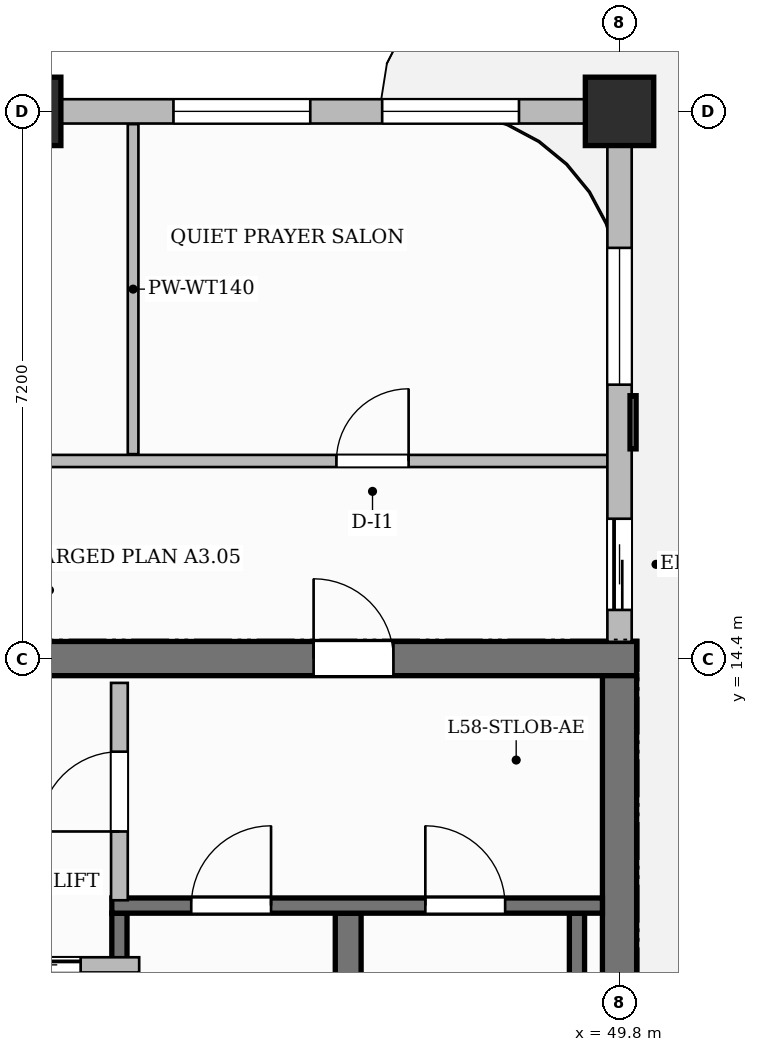
"""IFC4 building model, lengths in metres.
Left out: names, types, materials, properties, quantities, classifications, styles, units other than length and angle.
Written with IfcOpenShell. Run it as: python <this file> out.ifc"""

import sys

from ifc_helpers import new_model, si_unit, direction, frame, frame_2d, origin, origin_2d, place, context, subcontext, project, spatial, rectangle, extrude, source, transform, mapped, element, fill, save


model = new_model("IFC4")
c1 = context("Model", 3, precision=1e-05, world=origin(), true_north=direction((0.0, 1.0)))
c2 = subcontext(c1, "Body", "Model", "MODEL_VIEW")
j1 = project(units=[si_unit("LENGTHUNIT", "METRE"), si_unit("PLANEANGLEUNIT", "RADIAN")], contexts=[c1])
p1 = place(None, origin())
s1 = spatial("IfcSite", under=j1, at=p1, CompositionType="ELEMENT")
p2 = place(p1, origin())
s2 = spatial("IfcBuilding", under=s1, at=p2, CompositionType="ELEMENT")
p3 = place(p2, frame((0.0, 0.0, 232.7)))
s3 = spatial("IfcBuildingStorey", under=s2, at=p3, CompositionType="ELEMENT", Elevation=232.7)
p4 = place(p3, frame((34.575, 14.4, 0.0), z_axis=(0.0, 0.0, 1.0), x_axis=(1.0, 0.0, 0.0)))
e1 = element("IfcWall", 1, at=p4, inside=s3, PredefinedType="SHEAR", context=c2, shape_type="SweptSolid", body=[
    extrude(rectangle(XDim=15.45, YDim=0.45, at=frame_2d((7.725, 0.0))), origin(), (0.0, 0.0, 1.0), 3.85),
])
p5 = place(p4, frame((5.355, 0.0, 0.0)))
e2 = element("IfcOpeningElement", 2, at=p5, cuts=e1, PredefinedType="OPENING", context=c2, shape_type="SweptSolid", body=[
    extrude(rectangle(XDim=1.5, YDim=2.2, at=frame_2d((0.75, 1.1))), frame((0.0, 0.235, 0.0), z_axis=(0.0, -1.0, 0.0), x_axis=(1.0, 0.0, 0.0)), (0.0, 0.0, 1.0), 0.47),
])
p6 = place(p4, frame((1.57, 0.0, 0.0)))
e3 = element("IfcOpeningElement", 3, at=p6, cuts=e1, PredefinedType="OPENING", context=c2, shape_type="SweptSolid", body=[
    extrude(rectangle(XDim=1.05, YDim=2.15, at=frame_2d((0.525, 1.075))), frame((0.0, 0.235, 0.0), z_axis=(0.0, -1.0, 0.0), x_axis=(1.0, 0.0, 0.0)), (0.0, 0.0, 1.0), 0.47),
])
p7 = place(p4, frame((11.2, 0.0, 0.0)))
e4 = element("IfcOpeningElement", 4, at=p7, cuts=e1, PredefinedType="OPENING", context=c2, shape_type="SweptSolid", body=[
    extrude(rectangle(XDim=1.05, YDim=2.15, at=frame_2d((0.525, 1.075))), frame((0.0, 0.235, 0.0), z_axis=(0.0, -1.0, 0.0), x_axis=(1.0, 0.0, 0.0)), (0.0, 0.0, 1.0), 0.47),
])
p8 = place(p3, frame((49.8, 3.825, 0.0), z_axis=(0.0, 0.0, 1.0), x_axis=(0.0, 1.0, 0.0)))
e5 = element("IfcWall", 5, at=p8, inside=s3, PredefinedType="SHEAR", context=c2, shape_type="SweptSolid", body=[
    extrude(rectangle(XDim=10.35, YDim=0.45, at=frame_2d((5.175, 0.0))), origin(), (0.0, 0.0, 1.0), 3.85),
])
m1 = source(origin(), c2, "Body", "SweptSolid", [
    extrude(rectangle(XDim=0.9, YDim=0.9, at=origin_2d()), origin(), (0.0, 0.0, 1.0), 3.85),
])
for number, where, z_axis, x_axis in (
    (6, (42.0, 21.6, 0.0), (0.0, 0.0, 1.0), (1.0, 0.0, 0.0)),
    (7, (49.8, 21.6, 0.0), (0.0, 0.0, 1.0), (1.0, 0.0, 0.0)),
):
    element("IfcColumn", number, at=place(p3, frame(where, z_axis=z_axis, x_axis=x_axis)), inside=s3, PredefinedType="COLUMN", context=c2, shape_type="MappedRepresentation", body=[
        mapped(m1, transform((0.0, 0.0, 0.0), scale=1.0)),
    ])
p9 = place(p3, frame((43.22, 4.1, 0.0), z_axis=(0.0, 0.0, 1.0), x_axis=(0.0, 1.0, 0.0)))
e8 = element("IfcWall", 8, at=p9, inside=s3, PredefinedType="SHEAR", context=c2, shape_type="SweptSolid", body=[
    extrude(rectangle(XDim=6.95, YDim=0.2, at=frame_2d((3.475, 0.0))), origin(), (0.0, 0.0, 1.0), 3.85),
])
p10 = place(p3, frame((46.23, 4.1, 0.0), z_axis=(0.0, 0.0, 1.0), x_axis=(0.0, 1.0, 0.0)))
e9 = element("IfcWall", 9, at=p10, inside=s3, PredefinedType="SHEAR", context=c2, shape_type="SweptSolid", body=[
    extrude(rectangle(XDim=6.95, YDim=0.34, at=frame_2d((3.475, 0.0))), origin(), (0.0, 0.0, 1.0), 3.85),
])
p11 = place(p3, frame((49.24, 4.1, 0.0), z_axis=(0.0, 0.0, 1.0), x_axis=(0.0, 1.0, 0.0)))
e10 = element("IfcWall", 10, at=p11, inside=s3, PredefinedType="SHEAR", context=c2, shape_type="SweptSolid", body=[
    extrude(rectangle(XDim=6.95, YDim=0.2, at=frame_2d((3.475, 0.0))), origin(), (0.0, 0.0, 1.0), 3.85),
])
p12 = place(p3, frame((43.12, 11.15, 0.0), z_axis=(0.0, 0.0, 1.0), x_axis=(1.0, 0.0, 0.0)))
e11 = element("IfcWall", 11, at=p12, inside=s3, PredefinedType="SHEAR", context=c2, shape_type="SweptSolid", body=[
    extrude(rectangle(XDim=6.455, YDim=0.2, at=frame_2d((3.228, 0.0))), origin(), (0.0, 0.0, 1.0), 3.85),
])
p13 = place(p12, frame((1.045, 0.0, 0.0)))
e12 = element("IfcOpeningElement", 12, at=p13, cuts=e11, PredefinedType="OPENING", context=c2, shape_type="SweptSolid", body=[
    extrude(rectangle(XDim=1.05, YDim=2.2, at=frame_2d((0.525, 1.1))), frame((0.0, 0.11, 0.0), z_axis=(0.0, -1.0, 0.0), x_axis=(1.0, 0.0, 0.0)), (0.0, 0.0, 1.0), 0.22),
])
p14 = place(p12, frame((4.125, 0.0, 0.0)))
e13 = element("IfcOpeningElement", 13, at=p14, cuts=e11, PredefinedType="OPENING", context=c2, shape_type="SweptSolid", body=[
    extrude(rectangle(XDim=1.05, YDim=2.2, at=frame_2d((0.525, 1.1))), frame((0.0, 0.11, 0.0), z_axis=(0.0, -1.0, 0.0), x_axis=(1.0, 0.0, 0.0)), (0.0, 0.0, 1.0), 0.22),
])
p15 = place(p3, frame((43.22, 11.22, 0.0), z_axis=(0.0, 0.0, 1.0), x_axis=(0.0, 1.0, 0.0)))
e14 = element("IfcWall", 14, at=p15, inside=s3, PredefinedType="PARTITIONING", context=c2, shape_type="SweptSolid", body=[
    extrude(rectangle(XDim=2.86, YDim=0.22, at=frame_2d((1.43, 0.0))), origin(), (0.0, 0.0, 1.0), 3.6),
])
p16 = place(p15, frame((0.905, 0.0, 0.0)))
e15 = element("IfcOpeningElement", 15, at=p16, cuts=e14, PredefinedType="OPENING", context=c2, shape_type="SweptSolid", body=[
    extrude(rectangle(XDim=1.05, YDim=2.15, at=frame_2d((0.525, 1.075))), frame((0.0, 0.12, 0.0), z_axis=(0.0, -1.0, 0.0), x_axis=(1.0, 0.0, 0.0)), (0.0, 0.0, 1.0), 0.24),
])
p17 = place(p3, frame((30.29, 17.0, 0.0), z_axis=(0.0, 0.0, 1.0), x_axis=(1.0, 0.0, 0.0)))
e16 = element("IfcWall", 16, at=p17, inside=s3, PredefinedType="PARTITIONING", context=c2, shape_type="SweptSolid", body=[
    extrude(rectangle(XDim=19.37, YDim=0.16, at=frame_2d((9.685, 0.0))), origin(), (0.0, 0.0, 1.0), 3.6),
])
p18 = place(p17, frame((1.235, 0.0, 0.0)))
e17 = element("IfcOpeningElement", 17, at=p18, cuts=e16, PredefinedType="OPENING", context=c2, shape_type="SweptSolid", body=[
    extrude(rectangle(XDim=0.85, YDim=2.1, at=frame_2d((0.425, 1.05))), frame((0.0, 0.09, 0.0), z_axis=(0.0, -1.0, 0.0), x_axis=(1.0, 0.0, 0.0)), (0.0, 0.0, 1.0), 0.18),
])
p19 = place(p17, frame((7.56, 0.0, 0.0)))
e18 = element("IfcOpeningElement", 18, at=p19, cuts=e16, PredefinedType="OPENING", context=c2, shape_type="SweptSolid", body=[
    extrude(rectangle(XDim=1.4, YDim=2.35, at=frame_2d((0.7, 1.175))), frame((0.0, 0.09, 0.0), z_axis=(0.0, -1.0, 0.0), x_axis=(1.0, 0.0, 0.0)), (0.0, 0.0, 1.0), 0.18),
])
p20 = place(p17, frame((15.785, 0.0, 0.0)))
e19 = element("IfcOpeningElement", 19, at=p20, cuts=e16, PredefinedType="OPENING", context=c2, shape_type="SweptSolid", body=[
    extrude(rectangle(XDim=0.95, YDim=2.15, at=frame_2d((0.475, 1.075))), frame((0.0, 0.09, 0.0), z_axis=(0.0, -1.0, 0.0), x_axis=(1.0, 0.0, 0.0)), (0.0, 0.0, 1.0), 0.18),
])
p21 = place(p3, frame((43.4, 17.09, 0.0), z_axis=(0.0, 0.0, 1.0), x_axis=(0.0, 1.0, 0.0)))
e20 = element("IfcWall", 20, at=p21, inside=s3, PredefinedType="PARTITIONING", context=c2, shape_type="SweptSolid", body=[
    extrude(rectangle(XDim=4.342, YDim=0.14, at=frame_2d((2.171, 0.0))), origin(), (0.0, 0.0, 1.0), 3.6),
])
p22 = place(p3, frame((40.84, 10.37, 0.0), z_axis=(0.0, 0.0, 1.0), x_axis=(1.0, 0.0, 0.0)))
e21 = element("IfcWall", 21, at=p22, inside=s3, PredefinedType="PARTITIONING", context=c2, shape_type="SweptSolid", body=[
    extrude(rectangle(XDim=2.64, YDim=0.2, at=frame_2d((1.32, 0.0))), origin(), (0.0, 0.0, 1.0), 3.6),
])
p23 = place(p22, frame((0.77, 0.0, 0.0)))
e22 = element("IfcOpeningElement", 22, at=p23, cuts=e21, PredefinedType="OPENING", context=c2, shape_type="SweptSolid", body=[
    extrude(rectangle(XDim=1.1, YDim=2.2, at=frame_2d((0.55, 1.1))), frame((0.0, 0.11, 0.0), z_axis=(0.0, -1.0, 0.0), x_axis=(1.0, 0.0, 0.0)), (0.0, 0.0, 1.0), 0.22),
])
p24 = place(p3, frame((49.8, 14.62, 0.0), z_axis=(0.0, 0.0, 1.0), x_axis=(0.0, 1.0, 0.0)))
e23 = element("IfcWall", 23, at=p24, inside=s3, PredefinedType="SOLIDWALL", context=c2, shape_type="SweptSolid", body=[
    extrude(rectangle(XDim=6.93, YDim=0.32, at=frame_2d((3.465, 0.0))), origin(), (0.0, 0.0, 1.0), 3.135),
])
p25 = place(p24, frame((0.42, 0.0, 0.0)))
e24 = element("IfcOpeningElement", 24, at=p25, cuts=e23, PredefinedType="OPENING", context=c2, shape_type="SweptSolid", body=[
    extrude(rectangle(XDim=1.2, YDim=2.2, at=frame_2d((0.6, 1.1))), frame((0.0, 0.17, 0.0), z_axis=(0.0, -1.0, 0.0), x_axis=(1.0, 0.0, 0.0)), (0.0, 0.0, 1.0), 0.34),
])
p26 = place(p24, frame((3.384, 0.0, 0.8)))
e25 = element("IfcOpeningElement", 25, at=p26, cuts=e23, PredefinedType="OPENING", context=c2, shape_type="SweptSolid", body=[
    extrude(rectangle(XDim=1.8, YDim=1.85, at=frame_2d((0.9, 0.925))), frame((0.0, 0.17, 0.0), z_axis=(0.0, -1.0, 0.0), x_axis=(1.0, 0.0, 0.0)), (0.0, 0.0, 1.0), 0.34),
])
p27 = place(p3, frame((14.4, 21.6, 0.0), z_axis=(0.0, 0.0, 1.0), x_axis=(1.0, 0.0, 0.0)))
e26 = element("IfcWall", 26, at=p27, inside=s3, PredefinedType="SOLIDWALL", context=c2, shape_type="SweptSolid", body=[
    extrude(rectangle(XDim=35.4, YDim=0.32, at=frame_2d((17.7, 0.0))), origin(), (0.0, 0.0, 1.0), 3.135),
])
p28 = place(p27, frame((0.85, 0.0, 0.0)))
e27 = element("IfcOpeningElement", 27, at=p28, cuts=e26, PredefinedType="OPENING", context=c2, shape_type="SweptSolid", body=[
    extrude(rectangle(XDim=1.2, YDim=2.2, at=frame_2d((0.6, 1.1))), frame((0.0, 0.17, 0.0), z_axis=(0.0, -1.0, 0.0), x_axis=(1.0, 0.0, 0.0)), (0.0, 0.0, 1.0), 0.34),
])
p29 = place(p27, frame((2.811, 0.0, 0.8)))
e28 = element("IfcOpeningElement", 28, at=p29, cuts=e26, PredefinedType="OPENING", context=c2, shape_type="SweptSolid", body=[
    extrude(rectangle(XDim=1.8, YDim=1.85, at=frame_2d((0.9, 0.925))), frame((0.0, 0.17, 0.0), z_axis=(0.0, -1.0, 0.0), x_axis=(1.0, 0.0, 0.0)), (0.0, 0.0, 1.0), 0.34),
])
p30 = place(p27, frame((5.269, 0.0, 0.8)))
e29 = element("IfcOpeningElement", 29, at=p30, cuts=e26, PredefinedType="OPENING", context=c2, shape_type="SweptSolid", body=[
    extrude(rectangle(XDim=0.95, YDim=1.75, at=frame_2d((0.475, 0.875))), frame((0.0, 0.17, 0.0), z_axis=(0.0, -1.0, 0.0), x_axis=(1.0, 0.0, 0.0)), (0.0, 0.0, 1.0), 0.34),
])
p31 = place(p27, frame((8.696, 0.0, 0.8)))
e30 = element("IfcOpeningElement", 30, at=p31, cuts=e26, PredefinedType="OPENING", context=c2, shape_type="SweptSolid", body=[
    extrude(rectangle(XDim=1.8, YDim=1.85, at=frame_2d((0.9, 0.925))), frame((0.0, 0.17, 0.0), z_axis=(0.0, -1.0, 0.0), x_axis=(1.0, 0.0, 0.0)), (0.0, 0.0, 1.0), 0.34),
])
p32 = place(p27, frame((11.704, 0.0, 0.8)))
e31 = element("IfcOpeningElement", 31, at=p32, cuts=e26, PredefinedType="OPENING", context=c2, shape_type="SweptSolid", body=[
    extrude(rectangle(XDim=1.4, YDim=1.85, at=frame_2d((0.7, 0.925))), frame((0.0, 0.17, 0.0), z_axis=(0.0, -1.0, 0.0), x_axis=(1.0, 0.0, 0.0)), (0.0, 0.0, 1.0), 0.34),
])
p33 = place(p27, frame((16.651, 0.0, 0.8)))
e32 = element("IfcOpeningElement", 32, at=p33, cuts=e26, PredefinedType="OPENING", context=c2, shape_type="SweptSolid", body=[
    extrude(rectangle(XDim=1.8, YDim=1.85, at=frame_2d((0.9, 0.925))), frame((0.0, 0.17, 0.0), z_axis=(0.0, -1.0, 0.0), x_axis=(1.0, 0.0, 0.0)), (0.0, 0.0, 1.0), 0.34),
])
p34 = place(p27, frame((21.725, 0.0, 0.8)))
e33 = element("IfcOpeningElement", 33, at=p34, cuts=e26, PredefinedType="OPENING", context=c2, shape_type="SweptSolid", body=[
    extrude(rectangle(XDim=1.8, YDim=1.85, at=frame_2d((0.9, 0.925))), frame((0.0, 0.17, 0.0), z_axis=(0.0, -1.0, 0.0), x_axis=(1.0, 0.0, 0.0)), (0.0, 0.0, 1.0), 0.34),
])
p35 = place(p27, frame((24.475, 0.0, 0.8)))
e34 = element("IfcOpeningElement", 34, at=p35, cuts=e26, PredefinedType="OPENING", context=c2, shape_type="SweptSolid", body=[
    extrude(rectangle(XDim=1.8, YDim=1.85, at=frame_2d((0.9, 0.925))), frame((0.0, 0.17, 0.0), z_axis=(0.0, -1.0, 0.0), x_axis=(1.0, 0.0, 0.0)), (0.0, 0.0, 1.0), 0.34),
])
p36 = place(p27, frame((29.531, 0.0, 0.8)))
e35 = element("IfcOpeningElement", 35, at=p36, cuts=e26, PredefinedType="OPENING", context=c2, shape_type="SweptSolid", body=[
    extrude(rectangle(XDim=1.8, YDim=1.85, at=frame_2d((0.9, 0.925))), frame((0.0, 0.17, 0.0), z_axis=(0.0, -1.0, 0.0), x_axis=(1.0, 0.0, 0.0)), (0.0, 0.0, 1.0), 0.34),
])
p37 = place(p27, frame((32.277, 0.0, 0.8)))
e36 = element("IfcOpeningElement", 36, at=p37, cuts=e26, PredefinedType="OPENING", context=c2, shape_type="SweptSolid", body=[
    extrude(rectangle(XDim=1.8, YDim=1.85, at=frame_2d((0.9, 0.925))), frame((0.0, 0.17, 0.0), z_axis=(0.0, -1.0, 0.0), x_axis=(1.0, 0.0, 0.0)), (0.0, 0.0, 1.0), 0.34),
])
m2 = source(origin(), c2, "Body", "SweptSolid", [
    extrude(rectangle(XDim=1.05, YDim=2.2, at=frame_2d((0.525, 1.1))), frame((0.0, 0.025, 0.0), z_axis=(0.0, -1.0, 0.0), x_axis=(1.0, 0.0, 0.0)), (0.0, 0.0, 1.0), 0.05),
])
p38 = place(p13, origin())
e37 = element("IfcDoor", 37, at=p38, inside=s3, OperationType="SINGLE_SWING_RIGHT", PredefinedType="DOOR", context=c2, shape_type="MappedRepresentation", body=[
    mapped(m2, transform((0.0, 0.0, 0.0), scale=1.0)),
])
fill(e12, e37)
p39 = place(p14, origin())
e38 = element("IfcDoor", 38, at=p39, inside=s3, OperationType="SINGLE_SWING_LEFT", PredefinedType="DOOR", context=c2, shape_type="MappedRepresentation", body=[
    mapped(m2, transform((0.0, 0.0, 0.0), scale=1.0)),
])
fill(e13, e38)
m3 = source(origin(), c2, "Body", "SweptSolid", [
    extrude(rectangle(XDim=1.05, YDim=2.15, at=frame_2d((0.525, 1.075))), frame((0.0, 0.025, 0.0), z_axis=(0.0, -1.0, 0.0), x_axis=(1.0, 0.0, 0.0)), (0.0, 0.0, 1.0), 0.05),
])
p40 = place(p16, origin())
e39 = element("IfcDoor", 39, at=p40, inside=s3, OperationType="SINGLE_SWING_LEFT", PredefinedType="DOOR", context=c2, shape_type="MappedRepresentation", body=[
    mapped(m3, transform((0.0, 0.0, 0.0), scale=1.0)),
])
fill(e15, e39)
p41 = place(p7, origin())
e40 = element("IfcDoor", 40, at=p41, inside=s3, OperationType="SINGLE_SWING_LEFT", PredefinedType="DOOR", context=c2, shape_type="MappedRepresentation", body=[
    mapped(m3, transform((0.0, 0.0, 0.0), scale=1.0)),
])
fill(e4, e40)
m4 = source(origin(), c2, "Body", "SweptSolid", [
    extrude(rectangle(XDim=0.95, YDim=2.15, at=frame_2d((0.475, 1.075))), frame((0.0, 0.025, 0.0), z_axis=(0.0, -1.0, 0.0), x_axis=(1.0, 0.0, 0.0)), (0.0, 0.0, 1.0), 0.05),
])
p42 = place(p20, origin())
e41 = element("IfcDoor", 41, at=p42, inside=s3, OperationType="SINGLE_SWING_RIGHT", PredefinedType="DOOR", context=c2, shape_type="MappedRepresentation", body=[
    mapped(m4, transform((0.0, 0.0, 0.0), scale=1.0)),
])
fill(e19, e41)
m5 = source(origin(), c2, "Body", "SweptSolid", [
    extrude(rectangle(XDim=1.1, YDim=2.2, at=frame_2d((0.55, 1.1))), frame((0.0, 0.025, 0.0), z_axis=(0.0, -1.0, 0.0), x_axis=(1.0, 0.0, 0.0)), (0.0, 0.0, 1.0), 0.05),
])
p43 = place(p23, origin())
e42 = element("IfcDoor", 42, at=p43, inside=s3, OperationType="SLIDING_TO_LEFT", PredefinedType="DOOR", context=c2, shape_type="MappedRepresentation", body=[
    mapped(m5, transform((0.0, 0.0, 0.0), scale=1.0)),
])
fill(e22, e42)
m6 = source(origin(), c2, "Body", "SweptSolid", [
    extrude(rectangle(XDim=1.2, YDim=2.2, at=frame_2d((0.6, 1.1))), frame((0.0, 0.025, 0.0), z_axis=(0.0, -1.0, 0.0), x_axis=(1.0, 0.0, 0.0)), (0.0, 0.0, 1.0), 0.05),
])
p44 = place(p25, origin())
e43 = element("IfcDoor", 43, at=p44, inside=s3, OperationType="SLIDING_TO_LEFT", PredefinedType="DOOR", context=c2, shape_type="MappedRepresentation", body=[
    mapped(m6, transform((0.0, 0.0, 0.0), scale=1.0)),
])
fill(e24, e43)
m7 = source(origin(), c2, "Body", "SweptSolid", [
    extrude(rectangle(XDim=1.8, YDim=1.85, at=frame_2d((0.9, 0.925))), frame((0.0, 0.03, 0.0), z_axis=(0.0, -1.0, 0.0), x_axis=(1.0, 0.0, 0.0)), (0.0, 0.0, 1.0), 0.06),
])
p45 = place(p26, origin())
e44 = element("IfcWindow", 44, at=p45, inside=s3, PartitioningType="DOUBLE_PANEL_VERTICAL", PredefinedType="WINDOW", context=c2, shape_type="MappedRepresentation", body=[
    mapped(m7, transform((0.0, 0.0, 0.0), scale=1.0)),
])
fill(e25, e44)
p46 = place(p36, origin())
e45 = element("IfcWindow", 45, at=p46, inside=s3, PartitioningType="DOUBLE_PANEL_VERTICAL", PredefinedType="WINDOW", context=c2, shape_type="MappedRepresentation", body=[
    mapped(m7, transform((0.0, 0.0, 0.0), scale=1.0)),
])
fill(e35, e45)
p47 = place(p37, origin())
e46 = element("IfcWindow", 46, at=p47, inside=s3, PartitioningType="DOUBLE_PANEL_VERTICAL", PredefinedType="WINDOW", context=c2, shape_type="MappedRepresentation", body=[
    mapped(m7, transform((0.0, 0.0, 0.0), scale=1.0)),
])
fill(e36, e46)
save(model, sys.argv[1])
